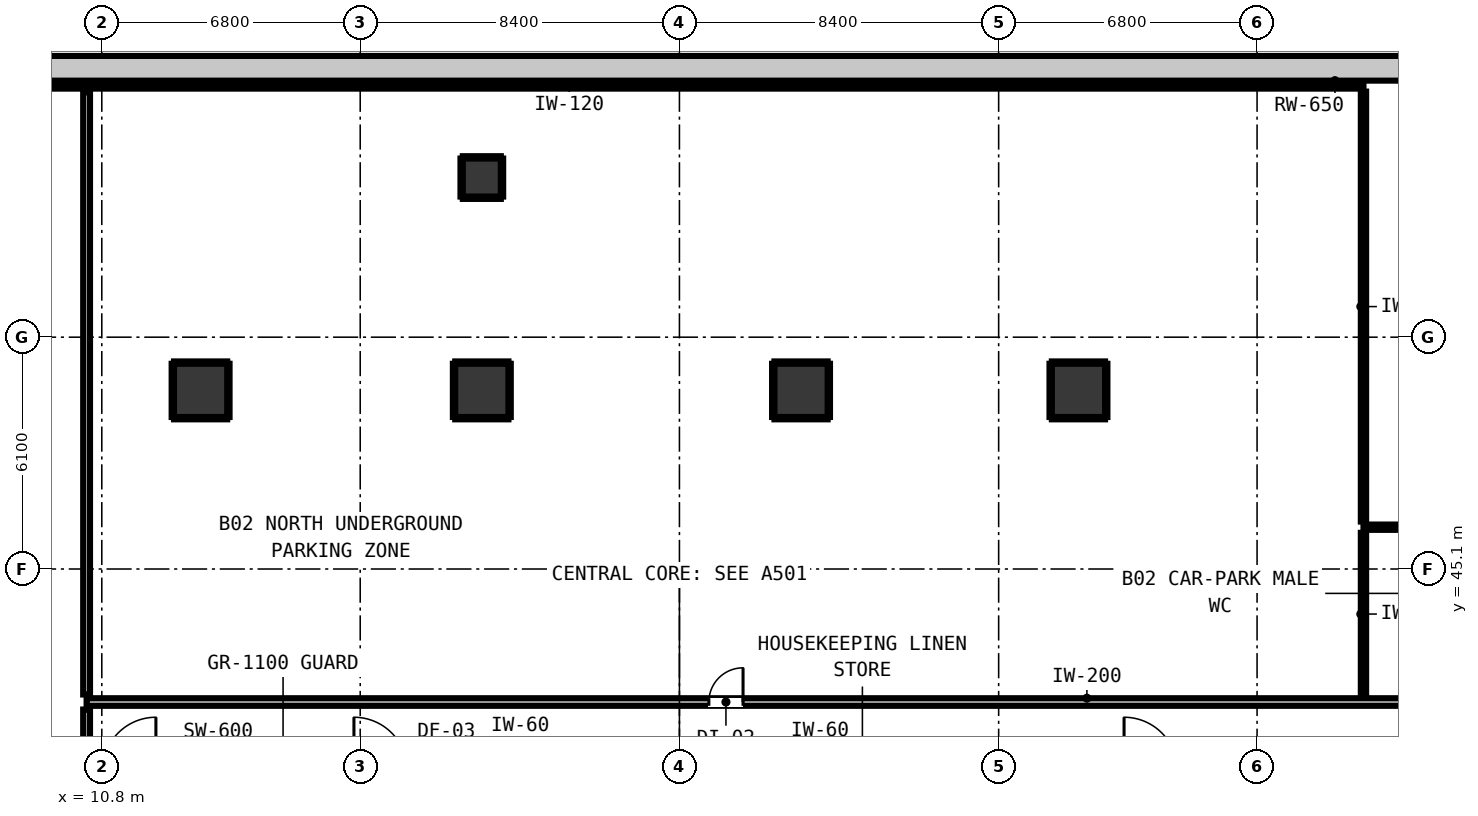
"""IFC4 building model, lengths in metres.
Left out: names, types, materials, properties, quantities, classifications, styles, units other than length and angle.
Written with IfcOpenShell. Run it as: python <this file> out.ifc"""

import sys

from ifc_helpers import new_model, si_unit, direction, frame, frame_2d, origin, origin_2d, place, context, subcontext, project, spatial, rectangle, extrude, element, fill, save


model = new_model("IFC4")
c1 = context("Model", 3, precision=1e-05, world=origin(), true_north=direction((0.0, 1.0)))
c2 = subcontext(c1, "Body", "Model", "MODEL_VIEW")
j1 = project(units=[si_unit("LENGTHUNIT", "METRE"), si_unit("PLANEANGLEUNIT", "RADIAN")], contexts=[c1])
p1 = place(None, origin())
s1 = spatial("IfcSite", under=j1, at=p1, CompositionType="ELEMENT")
p2 = place(p1, origin())
s2 = spatial("IfcBuilding", under=s1, at=p2, CompositionType="ELEMENT")
p3 = place(p2, frame((0.0, 0.0, -8.8)))
s3 = spatial("IfcBuildingStorey", under=s2, at=p3, CompositionType="ELEMENT", Elevation=-8.8)
p4 = place(p3, frame((85.0, 58.275, 0.0), z_axis=(0.0, 0.0, 1.0), x_axis=(-1.0, 0.0, 0.0)))
e1 = element("IfcWall", 1, at=p4, inside=s3, PredefinedType="SOLIDWALL", context=c2, shape_type="SweptSolid", body=[
    extrude(rectangle(XDim=83.5, YDim=0.65, at=frame_2d((41.75, 0.0))), origin(), (0.0, 0.0, 1.0), 4.4),
])
for number, where, z_axis, x_axis in (
    (2, (13.4, 49.8, 0.0), (0.0, 0.0, 1.0), (1.0, 0.0, 0.0)),
    (3, (20.8, 49.8, 0.0), (0.0, 0.0, 1.0), (1.0, 0.0, 0.0)),
    (4, (29.2, 49.8, 0.0), (0.0, 0.0, 1.0), (1.0, 0.0, 0.0)),
    (5, (36.5, 49.8, 0.0), (0.0, 0.0, 1.0), (1.0, 0.0, 0.0)),
):
    element("IfcColumn", number, at=place(p3, frame(where, z_axis=z_axis, x_axis=x_axis)), inside=s3, PredefinedType="COLUMN", context=c2, shape_type="SweptSolid", body=[
        extrude(rectangle(XDim=1.4, YDim=1.4, at=origin_2d()), origin(), (0.0, 0.0, 1.0), 4.4),
    ])
p5 = place(p3, frame((20.8, 55.4, 0.0), z_axis=(0.0, 0.0, 1.0), x_axis=(1.0, 0.0, 0.0)))
e6 = element("IfcColumn", 6, at=p5, inside=s3, PredefinedType="COLUMN", context=c2, shape_type="SweptSolid", body=[
    extrude(rectangle(XDim=1.0, YDim=1.0, at=origin_2d()), origin(), (0.0, 0.0, 1.0), 4.4),
])
p6 = place(p3, frame((10.4, 41.6, 0.0), z_axis=(0.0, 0.0, 1.0), x_axis=(1.0, 0.0, 0.0)))
e7 = element("IfcWall", 7, at=p6, inside=s3, PredefinedType="PARTITIONING", context=c2, shape_type="SweptSolid", body=[
    extrude(rectangle(XDim=44.788, YDim=0.2, at=frame_2d((22.394, 0.0))), origin(), (0.0, 0.0, 1.0), 4.1),
])
p7 = place(p6, frame((16.374, 0.0, 0.0)))
e8 = element("IfcOpeningElement", 8, at=p7, cuts=e7, PredefinedType="OPENING", context=c2, shape_type="SweptSolid", body=[
    extrude(rectangle(XDim=0.9, YDim=2.1, at=frame_2d((0.45, 1.05))), frame((0.0, 0.11, 0.0), z_axis=(0.0, -1.0, 0.0), x_axis=(1.0, 0.0, 0.0)), (0.0, 0.0, 1.0), 0.22),
])
p8 = place(p6, frame((35.37, 0.0, 0.0)))
e9 = element("IfcOpeningElement", 9, at=p8, cuts=e7, PredefinedType="OPENING", context=c2, shape_type="SweptSolid", body=[
    extrude(rectangle(XDim=0.86, YDim=2.02, at=frame_2d((0.43, 1.01))), frame((0.0, 0.11, 0.0), z_axis=(0.0, -1.0, 0.0), x_axis=(1.0, 0.0, 0.0)), (0.0, 0.0, 1.0), 0.22),
])
p9 = place(p6, frame((39.725, 0.0, 0.0)))
e10 = element("IfcOpeningElement", 10, at=p9, cuts=e7, PredefinedType="OPENING", context=c2, shape_type="SweptSolid", body=[
    extrude(rectangle(XDim=0.95, YDim=2.1, at=frame_2d((0.475, 1.05))), frame((0.0, 0.11, 0.0), z_axis=(0.0, -1.0, 0.0), x_axis=(1.0, 0.0, 0.0)), (0.0, 0.0, 1.0), 0.22),
])
p10 = place(p3, frame((44.0, 46.2, 0.0), z_axis=(0.0, 0.0, 1.0), x_axis=(1.0, 0.0, 0.0)))
e11 = element("IfcWall", 11, at=p10, inside=s3, PredefinedType="PARTITIONING", context=c2, shape_type="SweptSolid", body=[
    extrude(rectangle(XDim=8.8, YDim=0.14, at=frame_2d((4.4, 0.0))), origin(), (0.0, 0.0, 1.0), 4.1),
])
p11 = place(p3, frame((2.2, 57.8, 0.0), z_axis=(0.0, 0.0, 1.0), x_axis=(1.0, 0.0, 0.0)))
e12 = element("IfcWall", 12, at=p11, inside=s3, PredefinedType="PARTITIONING", context=c2, shape_type="SweptSolid", body=[
    extrude(rectangle(XDim=41.8, YDim=0.12, at=frame_2d((20.9, 0.0))), origin(), (0.0, 0.0, 1.0), 4.1),
])
p12 = place(p3, frame((10.4, 39.988, 0.0), z_axis=(0.0, 0.0, 1.0), x_axis=(0.0, 1.0, 0.0)))
e13 = element("IfcWall", 13, at=p12, inside=s3, PredefinedType="PARTITIONING", context=c2, shape_type="SweptSolid", body=[
    extrude(rectangle(XDim=1.414, YDim=0.18, at=frame_2d((0.707, 0.0))), origin(), (0.0, 0.0, 1.0), 4.1),
])
p13 = place(p3, frame((10.4, 41.798, 0.0), z_axis=(0.0, 0.0, 1.0), x_axis=(0.0, 1.0, 0.0)))
e14 = element("IfcWall", 14, at=p13, inside=s3, PredefinedType="PARTITIONING", context=c2, shape_type="SweptSolid", body=[
    extrude(rectangle(XDim=15.844, YDim=0.18, at=frame_2d((7.922, 0.0))), origin(), (0.0, 0.0, 1.0), 4.1),
])
p14 = place(p3, frame((44.0, 41.778, 0.0), z_axis=(0.0, 0.0, 1.0), x_axis=(0.0, 1.0, 0.0)))
e15 = element("IfcWall", 15, at=p14, inside=s3, PredefinedType="PARTITIONING", context=c2, shape_type="SweptSolid", body=[
    extrude(rectangle(XDim=4.274, YDim=0.14, at=frame_2d((2.137, 0.0))), origin(), (0.0, 0.0, 1.0), 4.1),
])
p15 = place(p3, frame((44.0, 46.348, 0.0), z_axis=(0.0, 0.0, 1.0), x_axis=(0.0, 1.0, 0.0)))
e16 = element("IfcWall", 16, at=p15, inside=s3, PredefinedType="PARTITIONING", context=c2, shape_type="SweptSolid", body=[
    extrude(rectangle(XDim=11.314, YDim=0.14, at=frame_2d((5.657, 0.0))), origin(), (0.0, 0.0, 1.0), 4.1),
])
for number, where, z_axis, x_axis in (
    (17, (12.7, 49.068, 0.0), (0.0, 0.0, 1.0), (1.0, 0.0, 0.0)),
    (18, (12.7, 50.532, 0.0), (0.0, 0.0, 1.0), (1.0, 0.0, 0.0)),
):
    element("IfcWall", number, at=place(p3, frame(where, z_axis=z_axis, x_axis=x_axis)), inside=s3, PredefinedType="PARTITIONING", context=c2, shape_type="SweptSolid", body=[
        extrude(rectangle(XDim=1.4, YDim=0.06, at=frame_2d((0.7, 0.0))), origin(), (0.0, 0.0, 1.0), 1.45),
    ])
for number, where, z_axis, x_axis in (
    (19, (12.668, 49.1, 0.0), (0.0, 0.0, 1.0), (0.0, 1.0, 0.0)),
    (20, (14.132, 49.1, 0.0), (0.0, 0.0, 1.0), (0.0, 1.0, 0.0)),
    (21, (20.1, 49.068, 0.0), (0.0, 0.0, 1.0), (1.0, 0.0, 0.0)),
    (22, (20.1, 50.532, 0.0), (0.0, 0.0, 1.0), (1.0, 0.0, 0.0)),
    (23, (20.068, 49.1, 0.0), (0.0, 0.0, 1.0), (0.0, 1.0, 0.0)),
    (24, (21.532, 49.1, 0.0), (0.0, 0.0, 1.0), (0.0, 1.0, 0.0)),
    (25, (28.5, 49.068, 0.0), (0.0, 0.0, 1.0), (1.0, 0.0, 0.0)),
    (26, (28.5, 50.532, 0.0), (0.0, 0.0, 1.0), (1.0, 0.0, 0.0)),
    (27, (28.468, 49.1, 0.0), (0.0, 0.0, 1.0), (0.0, 1.0, 0.0)),
    (28, (29.932, 49.1, 0.0), (0.0, 0.0, 1.0), (0.0, 1.0, 0.0)),
    (29, (35.8, 49.068, 0.0), (0.0, 0.0, 1.0), (1.0, 0.0, 0.0)),
    (30, (35.8, 50.532, 0.0), (0.0, 0.0, 1.0), (1.0, 0.0, 0.0)),
    (31, (35.768, 49.1, 0.0), (0.0, 0.0, 1.0), (0.0, 1.0, 0.0)),
    (32, (37.232, 49.1, 0.0), (0.0, 0.0, 1.0), (0.0, 1.0, 0.0)),
):
    element("IfcWall", number, at=place(p3, frame(where, z_axis=z_axis, x_axis=x_axis)), inside=s3, PredefinedType="PARTITIONING", context=c2, shape_type="SweptSolid", body=[
        extrude(rectangle(XDim=1.4, YDim=0.06, at=frame_2d((0.7, 0.0))), origin(), (0.0, 0.0, 1.0), 1.45),
    ])
for number, where, z_axis, x_axis in (
    (33, (20.3, 54.868, 0.0), (0.0, 0.0, 1.0), (1.0, 0.0, 0.0)),
    (34, (20.3, 55.932, 0.0), (0.0, 0.0, 1.0), (1.0, 0.0, 0.0)),
    (35, (20.268, 54.9, 0.0), (0.0, 0.0, 1.0), (0.0, 1.0, 0.0)),
    (36, (21.332, 54.9, 0.0), (0.0, 0.0, 1.0), (0.0, 1.0, 0.0)),
):
    element("IfcWall", number, at=place(p3, frame(where, z_axis=z_axis, x_axis=x_axis)), inside=s3, PredefinedType="PARTITIONING", context=c2, shape_type="SweptSolid", body=[
        extrude(rectangle(XDim=1.0, YDim=0.06, at=frame_2d((0.5, 0.0))), origin(), (0.0, 0.0, 1.0), 1.45),
    ])
p16 = place(p7, origin())
e37 = element("IfcDoor", 37, at=p16, inside=s3, OperationType="SINGLE_SWING_RIGHT", PredefinedType="DOOR", context=c2, shape_type="SweptSolid", body=[
    extrude(rectangle(XDim=0.9, YDim=2.1, at=frame_2d((0.45, 1.05))), frame((0.0, 0.025, 0.0), z_axis=(0.0, -1.0, 0.0), x_axis=(1.0, 0.0, 0.0)), (0.0, 0.0, 1.0), 0.05),
])
fill(e8, e37)
save(model, sys.argv[1])
